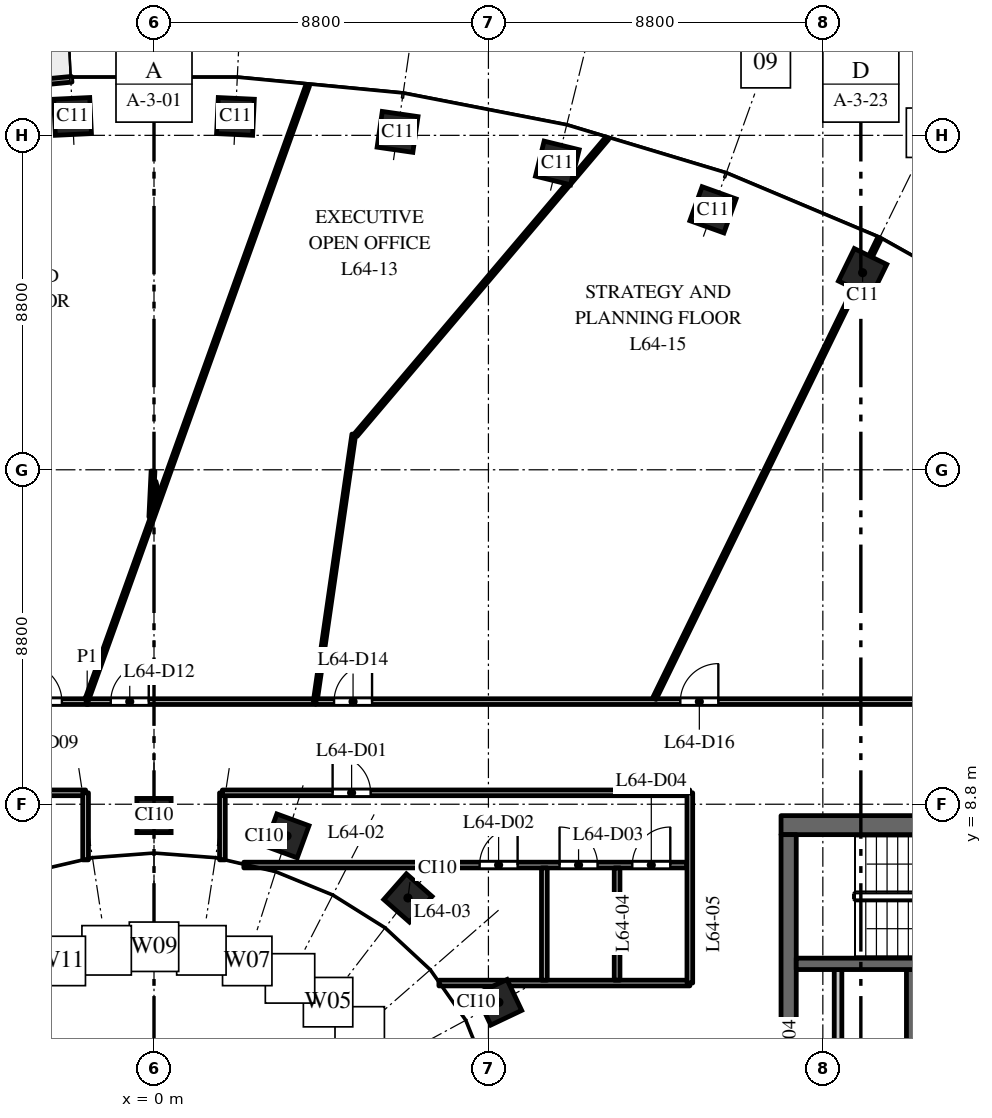
"""IFC4 building model, lengths in metres.
Left out: names, types, materials, properties, quantities, classifications, styles, units other than length and angle.
Written with IfcOpenShell. Run it as: python <this file> out.ifc"""

import sys

from ifc_helpers import new_model, si_unit, direction, frame, frame_2d, origin, origin_2d, place, context, subcontext, project, spatial, rectangle, extrude, element, fill, save


model = new_model("IFC4")
c1 = context("Model", 3, precision=1e-05, world=origin(), true_north=direction((0.0, 1.0)))
c2 = subcontext(c1, "Body", "Model", "MODEL_VIEW")
j1 = project(units=[si_unit("LENGTHUNIT", "METRE"), si_unit("PLANEANGLEUNIT", "RADIAN")], contexts=[c1])
p1 = place(None, origin())
s1 = spatial("IfcSite", under=j1, at=p1, CompositionType="ELEMENT")
p2 = place(p1, origin())
s2 = spatial("IfcBuilding", under=s1, at=p2, CompositionType="ELEMENT")
p3 = place(p2, frame((0.0, 0.0, 299.0)))
s3 = spatial("IfcBuildingStorey", under=s2, at=p3, CompositionType="ELEMENT", Elevation=299.0)
for number, where, z_axis, x_axis in (
    (1, (18.646, 22.785, 0.0), (0.0, 0.0, 1.0), (-0.898, 0.439, 0.0)),
    (2, (14.709, 24.441, 0.0), (0.0, 0.0, 1.0), (-0.941, 0.338, 0.0)),
    (3, (10.613, 25.674, 0.0), (0.0, 0.0, 1.0), (-0.971, 0.24, 0.0)),
    (4, (6.409, 26.491, 0.0), (0.0, 0.0, 1.0), (-0.99, 0.143, 0.0)),
    (5, (2.143, 26.898, 0.0), (0.0, 0.0, 1.0), (-0.999, 0.048, 0.0)),
    (6, (-2.143, 26.898, 0.0), (0.0, 0.0, 1.0), (-0.999, -0.048, 0.0)),
):
    element("IfcColumn", number, at=place(p3, frame(where, z_axis=z_axis, x_axis=x_axis)), inside=s3, PredefinedType="COLUMN", context=c2, shape_type="SweptSolid", body=[
        extrude(rectangle(XDim=0.95, YDim=0.95, at=origin_2d()), origin(), (0.0, 0.0, 1.0), 4.0),
    ])
for number, where, z_axis, x_axis in (
    (7, (9.076, 3.588, 0.0), (0.0, 0.0, 1.0), (-0.429, 0.903, 0.0)),
    (8, (6.682, 6.334, 0.0), (0.0, 0.0, 1.0), (-0.751, 0.66, 0.0)),
    (9, (3.501, 7.967, 0.0), (0.0, 0.0, 1.0), (-0.939, 0.344, 0.0)),
    (10, (0.0, 8.503, 0.0), (0.0, 0.0, 1.0), (-1.0, 0.0, 0.0)),
):
    element("IfcColumn", number, at=place(p3, frame(where, z_axis=z_axis, x_axis=x_axis)), inside=s3, PredefinedType="COLUMN", context=c2, shape_type="SweptSolid", body=[
        extrude(rectangle(XDim=0.9, YDim=0.9, at=origin_2d()), origin(), (0.0, 0.0, 1.0), 4.0),
    ])
p4 = place(p3, frame((16.5, 8.25, 0.0), z_axis=(0.0, 0.0, 1.0), x_axis=(1.0, 0.0, 0.0)))
e11 = element("IfcWall", 11, at=p4, inside=s3, PredefinedType="SHEAR", context=c2, shape_type="SweptSolid", body=[
    extrude(rectangle(XDim=15.0, YDim=0.5, at=frame_2d((7.5, 0.0))), origin(), (0.0, 0.0, 1.0), 3.7),
])
p5 = place(p4, frame((6.9, 0.0, 0.0)))
e12 = element("IfcOpeningElement", 12, at=p5, cuts=e11, PredefinedType="OPENING", context=c2, shape_type="SweptSolid", body=[
    extrude(rectangle(XDim=1.2, YDim=2.1, at=frame_2d((0.6, 1.05))), frame((0.0, 0.26, 0.0), z_axis=(0.0, -1.0, 0.0), x_axis=(1.0, 0.0, 0.0)), (0.0, 0.0, 1.0), 0.52),
])
p6 = place(p4, frame((12.425, 0.0, 0.0)))
e13 = element("IfcOpeningElement", 13, at=p6, cuts=e11, PredefinedType="OPENING", context=c2, shape_type="SweptSolid", body=[
    extrude(rectangle(XDim=0.9, YDim=2.1, at=frame_2d((0.45, 1.05))), frame((0.0, 0.26, 0.0), z_axis=(0.0, -1.0, 0.0), x_axis=(1.0, 0.0, 0.0)), (0.0, 0.0, 1.0), 0.52),
])
p7 = place(p3, frame((18.0, -0.45, 0.0), z_axis=(0.0, 0.0, 1.0), x_axis=(0.0, 1.0, 0.0)))
e14 = element("IfcWall", 14, at=p7, inside=s3, PredefinedType="PARTITIONING", context=c2, shape_type="SweptSolid", body=[
    extrude(rectangle(XDim=4.9, YDim=0.2, at=frame_2d((2.45, 0.0))), origin(), (0.0, 0.0, 1.0), 3.7),
])
p8 = place(p7, frame((2.0, 0.0, 0.0)))
e15 = element("IfcOpeningElement", 15, at=p8, cuts=e14, PredefinedType="OPENING", context=c2, shape_type="SweptSolid", body=[
    extrude(rectangle(XDim=0.9, YDim=2.1, at=frame_2d((0.45, 1.05))), frame((0.0, 0.11, 0.0), z_axis=(0.0, -1.0, 0.0), x_axis=(1.0, 0.0, 0.0)), (0.0, 0.0, 1.0), 0.22),
])
p9 = place(p3, frame((19.95, -4.45, 0.0), z_axis=(0.0, 0.0, 1.0), x_axis=(0.0, 1.0, 0.0)))
e16 = element("IfcWall", 16, at=p9, inside=s3, PredefinedType="SHEAR", context=c2, shape_type="SweptSolid", body=[
    extrude(rectangle(XDim=8.9, YDim=0.3, at=frame_2d((4.45, 0.0))), origin(), (0.0, 0.0, 1.0), 3.7),
])
p10 = place(p9, frame((0.775, 0.0, 0.0)))
e17 = element("IfcOpeningElement", 17, at=p10, cuts=e16, PredefinedType="OPENING", context=c2, shape_type="SweptSolid", body=[
    extrude(rectangle(XDim=1.2, YDim=2.1, at=frame_2d((0.6, 1.05))), frame((0.0, 0.16, 0.0), z_axis=(0.0, -1.0, 0.0), x_axis=(1.0, 0.0, 0.0)), (0.0, 0.0, 1.0), 0.32),
])
p11 = place(p9, frame((6.0, 0.0, 0.0)))
e18 = element("IfcOpeningElement", 18, at=p11, cuts=e16, PredefinedType="OPENING", context=c2, shape_type="SweptSolid", body=[
    extrude(rectangle(XDim=0.9, YDim=2.1, at=frame_2d((0.45, 1.05))), frame((0.0, 0.16, 0.0), z_axis=(0.0, -1.0, 0.0), x_axis=(1.0, 0.0, 0.0)), (0.0, 0.0, 1.0), 0.32),
])
p12 = place(p3, frame((16.7, -8.0, 0.0), z_axis=(0.0, 0.0, 1.0), x_axis=(0.0, 1.0, 0.0)))
e19 = element("IfcWall", 19, at=p12, inside=s3, PredefinedType="SHEAR", context=c2, shape_type="SweptSolid", body=[
    extrude(rectangle(XDim=16.0, YDim=0.4, at=frame_2d((8.0, 0.0))), origin(), (0.0, 0.0, 1.0), 3.7),
])
p13 = place(p3, frame((16.9, 4.6, 0.0), z_axis=(0.0, 0.0, 1.0), x_axis=(1.0, 0.0, 0.0)))
e20 = element("IfcWall", 20, at=p13, inside=s3, PredefinedType="SHEAR", context=c2, shape_type="SweptSolid", body=[
    extrude(rectangle(XDim=6.18, YDim=0.3, at=frame_2d((3.09, 0.0))), origin(), (0.0, 0.0, 1.0), 3.7),
])
p14 = place(p13, frame((4.9, 0.0, 0.0)))
e21 = element("IfcOpeningElement", 21, at=p14, cuts=e20, PredefinedType="OPENING", context=c2, shape_type="SweptSolid", body=[
    extrude(rectangle(XDim=1.1, YDim=2.1, at=frame_2d((0.55, 1.05))), frame((0.0, 0.16, 0.0), z_axis=(0.0, -1.0, 0.0), x_axis=(1.0, 0.0, 0.0)), (0.0, 0.0, 1.0), 0.32),
])
p15 = place(p3, frame((-2.166, 27.875, 0.0), z_axis=(0.0, 0.0, 1.0), x_axis=(-0.995473879823, -0.095035543824, 0.0)))
e22 = element("IfcWall", 22, at=p15, inside=s3, PredefinedType="STANDARD", context=c2, shape_type="SweptSolid", body=[
    extrude(rectangle(XDim=4.426, YDim=0.15, at=frame_2d((2.213, 0.0))), origin(), (0.0, 0.0, 1.0), 3.7),
])
p16 = place(p15, frame((1.713, 0.0, 0.0)))
e23 = element("IfcOpeningElement", 23, at=p16, cuts=e22, PredefinedType="OPENING", context=c2, shape_type="SweptSolid", body=[
    extrude(rectangle(XDim=1.0, YDim=2.4, at=frame_2d((0.5, 1.2))), frame((0.0, 0.085, 0.0), z_axis=(0.0, -1.0, 0.0), x_axis=(1.0, 0.0, 0.0)), (0.0, 0.0, 1.0), 0.17),
])
p17 = place(p3, frame((-31.5, 11.5, 0.0), z_axis=(0.0, 0.0, 1.0), x_axis=(1.0, 0.0, 0.0)))
e24 = element("IfcWall", 24, at=p17, inside=s3, PredefinedType="PARTITIONING", context=c2, shape_type="SweptSolid", body=[
    extrude(rectangle(XDim=29.768, YDim=0.15, at=frame_2d((14.884, 0.0))), origin(), (0.0, 0.0, 1.0), 2.75),
])
p18 = place(p17, frame((4.249, 0.0, 0.0)))
e25 = element("IfcOpeningElement", 25, at=p18, cuts=e24, PredefinedType="OPENING", context=c2, shape_type="SweptSolid", body=[
    extrude(rectangle(XDim=1.0, YDim=2.1, at=frame_2d((0.5, 1.05))), frame((0.0, 0.085, 0.0), z_axis=(0.0, -1.0, 0.0), x_axis=(1.0, 0.0, 0.0)), (0.0, 0.0, 1.0), 0.17),
])
p19 = place(p17, frame((16.471, 0.0, 0.0)))
e26 = element("IfcOpeningElement", 26, at=p19, cuts=e24, PredefinedType="OPENING", context=c2, shape_type="SweptSolid", body=[
    extrude(rectangle(XDim=1.0, YDim=2.1, at=frame_2d((0.5, 1.05))), frame((0.0, 0.085, 0.0), z_axis=(0.0, -1.0, 0.0), x_axis=(1.0, 0.0, 0.0)), (0.0, 0.0, 1.0), 0.17),
])
p20 = place(p17, frame((28.076, 0.0, 0.0)))
e27 = element("IfcOpeningElement", 27, at=p20, cuts=e24, PredefinedType="OPENING", context=c2, shape_type="SweptSolid", body=[
    extrude(rectangle(XDim=1.0, YDim=2.1, at=frame_2d((0.5, 1.05))), frame((0.0, 0.085, 0.0), z_axis=(0.0, -1.0, 0.0), x_axis=(1.0, 0.0, 0.0)), (0.0, 0.0, 1.0), 0.17),
])
p21 = place(p17, frame((19.062, 0.0, 0.0)))
e28 = element("IfcOpeningElement", 28, at=p21, cuts=e24, PredefinedType="OPENING", context=c2, shape_type="SweptSolid", body=[
    extrude(rectangle(XDim=1.0, YDim=2.1, at=frame_2d((0.5, 1.05))), frame((0.0, 0.085, 0.0), z_axis=(0.0, -1.0, 0.0), x_axis=(1.0, 0.0, 0.0)), (0.0, 0.0, 1.0), 0.17),
])
p22 = place(p3, frame((-14.1, 9.1, 0.0), z_axis=(0.0, 0.0, 1.0), x_axis=(1.0, 0.0, 0.0)))
e29 = element("IfcWall", 29, at=p22, inside=s3, PredefinedType="PARTITIONING", context=c2, shape_type="SweptSolid", body=[
    extrude(rectangle(XDim=12.3, YDim=0.15, at=frame_2d((6.15, 0.0))), origin(), (0.0, 0.0, 1.0), 2.75),
])
p23 = place(p22, frame((0.65, 0.0, 0.0)))
e30 = element("IfcOpeningElement", 30, at=p23, cuts=e29, PredefinedType="OPENING", context=c2, shape_type="SweptSolid", body=[
    extrude(rectangle(XDim=1.0, YDim=2.1, at=frame_2d((0.5, 1.05))), frame((0.0, 0.085, 0.0), z_axis=(0.0, -1.0, 0.0), x_axis=(1.0, 0.0, 0.0)), (0.0, 0.0, 1.0), 0.17),
])
p24 = place(p3, frame((-1.8, 7.336, 0.0), z_axis=(0.0, 0.0, 1.0), x_axis=(0.0, 1.0, 0.0)))
e31 = element("IfcWall", 31, at=p24, inside=s3, PredefinedType="PARTITIONING", context=c2, shape_type="SweptSolid", body=[
    extrude(rectangle(XDim=1.764, YDim=0.15, at=frame_2d((0.882, 0.0))), origin(), (0.0, 0.0, 1.0), 3.0),
])
p25 = place(p3, frame((-1.758, 11.579, 0.0), z_axis=(0.0, 0.0, 1.0), x_axis=(0.338425059236, 0.940993347097, 0.0)))
e32 = element("IfcWall", 32, at=p25, inside=s3, PredefinedType="PARTITIONING", context=c2, shape_type="SweptSolid", body=[
    extrude(rectangle(XDim=17.15, YDim=0.1, at=frame_2d((8.575, 0.0))), origin(), (0.0, 0.0, 1.0), 2.85),
])
p26 = place(p3, frame((-1.774, 11.5, 0.0), z_axis=(0.0, 0.0, 1.0), x_axis=(1.0, 0.0, 0.0)))
e33 = element("IfcWall", 33, at=p26, inside=s3, PredefinedType="PARTITIONING", context=c2, shape_type="SweptSolid", body=[
    extrude(rectangle(XDim=6.016, YDim=0.15, at=frame_2d((3.008, 0.0))), origin(), (0.0, 0.0, 1.0), 2.85),
])
p27 = place(p26, frame((0.636, 0.0, 0.0)))
e34 = element("IfcOpeningElement", 34, at=p27, cuts=e33, PredefinedType="OPENING", context=c2, shape_type="SweptSolid", body=[
    extrude(rectangle(XDim=1.0, YDim=2.1, at=frame_2d((0.5, 1.05))), frame((0.0, 0.085, 0.0), z_axis=(0.0, -1.0, 0.0), x_axis=(1.0, 0.0, 0.0)), (0.0, 0.0, 1.0), 0.17),
])
p28 = place(p3, frame((-0.084, 16.356, 0.0), z_axis=(0.0, 0.0, 1.0), x_axis=(0.047967320325, 0.998848905581, 0.0)))
e35 = element("IfcWall", 35, at=p28, inside=s3, PredefinedType="PARTITIONING", context=c2, shape_type="SweptSolid", body=[
    extrude(rectangle(XDim=1.211, YDim=0.1, at=frame_2d((0.606, 0.0))), origin(), (0.0, 0.0, 1.0), 3.7),
])
p29 = place(p3, frame((0.002, 17.284, 0.0), z_axis=(0.0, 0.0, 1.0), x_axis=(0.240121592304, -0.970742819139, 0.0)))
e36 = element("IfcWall", 36, at=p29, inside=s3, PredefinedType="PARTITIONING", context=c2, shape_type="SweptSolid", body=[
    extrude(rectangle(XDim=0.405, YDim=0.1, at=frame_2d((0.202, 0.0))), origin(), (0.0, 0.0, 1.0), 3.7),
])
p30 = place(p3, frame((1.8, 7.336, 0.0), z_axis=(0.0, 0.0, 1.0), x_axis=(0.0, 1.0, 0.0)))
e37 = element("IfcWall", 37, at=p30, inside=s3, PredefinedType="PARTITIONING", context=c2, shape_type="SweptSolid", body=[
    extrude(rectangle(XDim=1.764, YDim=0.15, at=frame_2d((0.882, 0.0))), origin(), (0.0, 0.0, 1.0), 3.0),
])
p31 = place(p3, frame((1.8, 9.1, 0.0), z_axis=(0.0, 0.0, 1.0), x_axis=(1.0, 0.0, 0.0)))
e38 = element("IfcWall", 38, at=p31, inside=s3, PredefinedType="PARTITIONING", context=c2, shape_type="SweptSolid", body=[
    extrude(rectangle(XDim=12.3, YDim=0.15, at=frame_2d((6.15, 0.0))), origin(), (0.0, 0.0, 1.0), 2.85),
])
p32 = place(p31, frame((2.9, 0.0, 0.0)))
e39 = element("IfcOpeningElement", 39, at=p32, cuts=e38, PredefinedType="OPENING", context=c2, shape_type="SweptSolid", body=[
    extrude(rectangle(XDim=1.0, YDim=2.1, at=frame_2d((0.5, 1.05))), frame((0.0, 0.085, 0.0), z_axis=(0.0, -1.0, 0.0), x_axis=(1.0, 0.0, 0.0)), (0.0, 0.0, 1.0), 0.17),
])
p33 = place(p3, frame((2.364, 7.2, 0.0), z_axis=(0.0, 0.0, 1.0), x_axis=(1.0, 0.0, 0.0)))
e40 = element("IfcWall", 40, at=p33, inside=s3, PredefinedType="PARTITIONING", context=c2, shape_type="SweptSolid", body=[
    extrude(rectangle(XDim=11.661, YDim=0.15, at=frame_2d((5.831, 0.0))), origin(), (0.0, 0.0, 1.0), 2.75),
])
p34 = place(p33, frame((6.204, 0.0, 0.0)))
e41 = element("IfcOpeningElement", 41, at=p34, cuts=e40, PredefinedType="OPENING", context=c2, shape_type="SweptSolid", body=[
    extrude(rectangle(XDim=1.0, YDim=2.1, at=frame_2d((0.5, 1.05))), frame((0.0, 0.085, 0.0), z_axis=(0.0, -1.0, 0.0), x_axis=(1.0, 0.0, 0.0)), (0.0, 0.0, 1.0), 0.17),
])
p35 = place(p33, frame((8.308, 0.0, 0.0)))
e42 = element("IfcOpeningElement", 42, at=p35, cuts=e40, PredefinedType="OPENING", context=c2, shape_type="SweptSolid", body=[
    extrude(rectangle(XDim=1.0, YDim=2.1, at=frame_2d((0.5, 1.05))), frame((0.0, 0.085, 0.0), z_axis=(0.0, -1.0, 0.0), x_axis=(1.0, 0.0, 0.0)), (0.0, 0.0, 1.0), 0.17),
])
p36 = place(p33, frame((10.222, 0.0, 0.0)))
e43 = element("IfcOpeningElement", 43, at=p36, cuts=e40, PredefinedType="OPENING", context=c2, shape_type="SweptSolid", body=[
    extrude(rectangle(XDim=1.0, YDim=2.1, at=frame_2d((0.5, 1.05))), frame((0.0, 0.085, 0.0), z_axis=(0.0, -1.0, 0.0), x_axis=(1.0, 0.0, 0.0)), (0.0, 0.0, 1.0), 0.17),
])
p37 = place(p3, frame((4.242, 11.5, 0.0), z_axis=(0.0, 0.0, 1.0), x_axis=(0.1429940435, 0.98972354904, 0.0)))
e44 = element("IfcWall", 44, at=p37, inside=s3, PredefinedType="PARTITIONING", context=c2, shape_type="SweptSolid", body=[
    extrude(rectangle(XDim=7.106, YDim=0.1, at=frame_2d((3.553, 0.0))), origin(), (0.0, 0.0, 1.0), 3.7),
])
p38 = place(p3, frame((4.262, 11.5, 0.0), z_axis=(0.0, 0.0, 1.0), x_axis=(1.0, 0.0, 0.0)))
e45 = element("IfcWall", 45, at=p38, inside=s3, PredefinedType="PARTITIONING", context=c2, shape_type="SweptSolid", body=[
    extrude(rectangle(XDim=27.238, YDim=0.15, at=frame_2d((13.619, 0.0))), origin(), (0.0, 0.0, 1.0), 2.75),
])
p39 = place(p38, frame((0.476, 0.0, 0.0)))
e46 = element("IfcOpeningElement", 46, at=p39, cuts=e45, PredefinedType="OPENING", context=c2, shape_type="SweptSolid", body=[
    extrude(rectangle(XDim=1.0, YDim=2.1, at=frame_2d((0.5, 1.05))), frame((0.0, 0.085, 0.0), z_axis=(0.0, -1.0, 0.0), x_axis=(1.0, 0.0, 0.0)), (0.0, 0.0, 1.0), 0.17),
])
p40 = place(p38, frame((9.588, 0.0, 0.0)))
e47 = element("IfcOpeningElement", 47, at=p40, cuts=e45, PredefinedType="OPENING", context=c2, shape_type="SweptSolid", body=[
    extrude(rectangle(XDim=1.0, YDim=2.1, at=frame_2d((0.5, 1.05))), frame((0.0, 0.085, 0.0), z_axis=(0.0, -1.0, 0.0), x_axis=(1.0, 0.0, 0.0)), (0.0, 0.0, 1.0), 0.17),
])
p41 = place(p3, frame((5.306, 18.512, 0.0), z_axis=(0.0, 0.0, 1.0), x_axis=(0.646500054355, 0.762913939917, 0.0)))
e48 = element("IfcWall", 48, at=p41, inside=s3, PredefinedType="PARTITIONING", context=c2, shape_type="SweptSolid", body=[
    extrude(rectangle(XDim=10.239, YDim=0.1, at=frame_2d((5.119, 0.0))), origin(), (0.0, 0.0, 1.0), 3.0),
])
p42 = place(p3, frame((7.497, 4.095, 0.0), z_axis=(0.0, 0.0, 1.0), x_axis=(1.0, 0.0, 0.0)))
e49 = element("IfcWall", 49, at=p42, inside=s3, PredefinedType="PARTITIONING", context=c2, shape_type="SweptSolid", body=[
    extrude(rectangle(XDim=6.603, YDim=0.15, at=frame_2d((3.302, 0.0))), origin(), (0.0, 0.0, 1.0), 3.0),
])
for number, where, z_axis, x_axis in (
    (50, (10.272, 4.17, 0.0), (0.0, 0.0, 1.0), (0.0, 1.0, 0.0)),
    (51, (12.186, 4.17, 0.0), (0.0, 0.0, 1.0), (0.0, 1.0, 0.0)),
):
    element("IfcWall", number, at=place(p3, frame(where, z_axis=z_axis, x_axis=x_axis)), inside=s3, PredefinedType="PARTITIONING", context=c2, shape_type="SweptSolid", body=[
        extrude(rectangle(XDim=2.955, YDim=0.15, at=frame_2d((1.478, 0.0))), origin(), (0.0, 0.0, 1.0), 2.75),
    ])
p43 = place(p3, frame((13.167, 11.579, 0.0), z_axis=(0.0, 0.0, 1.0), x_axis=(0.439238726833, 0.898370380661, 0.0)))
e52 = element("IfcWall", 52, at=p43, inside=s3, PredefinedType="PARTITIONING", context=c2, shape_type="SweptSolid", body=[
    extrude(rectangle(XDim=13.475, YDim=0.1, at=frame_2d((6.738, 0.0))), origin(), (0.0, 0.0, 1.0), 3.0),
])
p44 = place(p3, frame((14.1, 4.095, 0.0), z_axis=(0.0, 0.0, 1.0), x_axis=(0.0, 1.0, 0.0)))
e53 = element("IfcWall", 53, at=p44, inside=s3, PredefinedType="PARTITIONING", context=c2, shape_type="SweptSolid", body=[
    extrude(rectangle(XDim=5.005, YDim=0.15, at=frame_2d((2.502, 0.0))), origin(), (0.0, 0.0, 1.0), 2.75),
])
p45 = place(p32, origin())
e54 = element("IfcDoor", 54, at=p45, inside=s3, OperationType="SINGLE_SWING_LEFT", PredefinedType="DOOR", context=c2, shape_type="SweptSolid", body=[
    extrude(rectangle(XDim=1.0, YDim=2.1, at=frame_2d((0.5, 1.05))), frame((0.0, 0.025, 0.0), z_axis=(0.0, -1.0, 0.0), x_axis=(1.0, 0.0, 0.0)), (0.0, 0.0, 1.0), 0.05),
])
fill(e39, e54)
p46 = place(p34, origin())
e55 = element("IfcDoor", 55, at=p46, inside=s3, OperationType="SINGLE_SWING_RIGHT", PredefinedType="DOOR", context=c2, shape_type="SweptSolid", body=[
    extrude(rectangle(XDim=1.0, YDim=2.1, at=frame_2d((0.5, 1.05))), frame((0.0, 0.025, 0.0), z_axis=(0.0, -1.0, 0.0), x_axis=(1.0, 0.0, 0.0)), (0.0, 0.0, 1.0), 0.05),
])
fill(e41, e55)
p47 = place(p35, origin())
e56 = element("IfcDoor", 56, at=p47, inside=s3, OperationType="SINGLE_SWING_LEFT", PredefinedType="DOOR", context=c2, shape_type="SweptSolid", body=[
    extrude(rectangle(XDim=1.0, YDim=2.1, at=frame_2d((0.5, 1.05))), frame((0.0, 0.025, 0.0), z_axis=(0.0, -1.0, 0.0), x_axis=(1.0, 0.0, 0.0)), (0.0, 0.0, 1.0), 0.05),
])
fill(e42, e56)
p48 = place(p36, origin())
e57 = element("IfcDoor", 57, at=p48, inside=s3, OperationType="SINGLE_SWING_RIGHT", PredefinedType="DOOR", context=c2, shape_type="SweptSolid", body=[
    extrude(rectangle(XDim=1.0, YDim=2.1, at=frame_2d((0.5, 1.05))), frame((0.0, 0.025, 0.0), z_axis=(0.0, -1.0, 0.0), x_axis=(1.0, 0.0, 0.0)), (0.0, 0.0, 1.0), 0.05),
])
fill(e43, e57)
p49 = place(p20, origin())
e58 = element("IfcDoor", 58, at=p49, inside=s3, OperationType="SINGLE_SWING_LEFT", PredefinedType="DOOR", context=c2, shape_type="SweptSolid", body=[
    extrude(rectangle(XDim=1.0, YDim=2.1, at=frame_2d((0.5, 1.05))), frame((0.0, 0.025, 0.0), z_axis=(0.0, -1.0, 0.0), x_axis=(1.0, 0.0, 0.0)), (0.0, 0.0, 1.0), 0.05),
])
fill(e27, e58)
p50 = place(p27, origin())
e59 = element("IfcDoor", 59, at=p50, inside=s3, OperationType="SINGLE_SWING_RIGHT", PredefinedType="DOOR", context=c2, shape_type="SweptSolid", body=[
    extrude(rectangle(XDim=1.0, YDim=2.1, at=frame_2d((0.5, 1.05))), frame((0.0, 0.025, 0.0), z_axis=(0.0, -1.0, 0.0), x_axis=(1.0, 0.0, 0.0)), (0.0, 0.0, 1.0), 0.05),
])
fill(e34, e59)
p51 = place(p39, origin())
e60 = element("IfcDoor", 60, at=p51, inside=s3, OperationType="SINGLE_SWING_RIGHT", PredefinedType="DOOR", context=c2, shape_type="SweptSolid", body=[
    extrude(rectangle(XDim=1.0, YDim=2.1, at=frame_2d((0.5, 1.05))), frame((0.0, 0.025, 0.0), z_axis=(0.0, -1.0, 0.0), x_axis=(1.0, 0.0, 0.0)), (0.0, 0.0, 1.0), 0.05),
])
fill(e46, e60)
p52 = place(p40, origin())
e61 = element("IfcDoor", 61, at=p52, inside=s3, OperationType="SINGLE_SWING_RIGHT", PredefinedType="DOOR", context=c2, shape_type="SweptSolid", body=[
    extrude(rectangle(XDim=1.0, YDim=2.1, at=frame_2d((0.5, 1.05))), frame((0.0, 0.025, 0.0), z_axis=(0.0, -1.0, 0.0), x_axis=(1.0, 0.0, 0.0)), (0.0, 0.0, 1.0), 0.05),
])
fill(e47, e61)
save(model, sys.argv[1])
